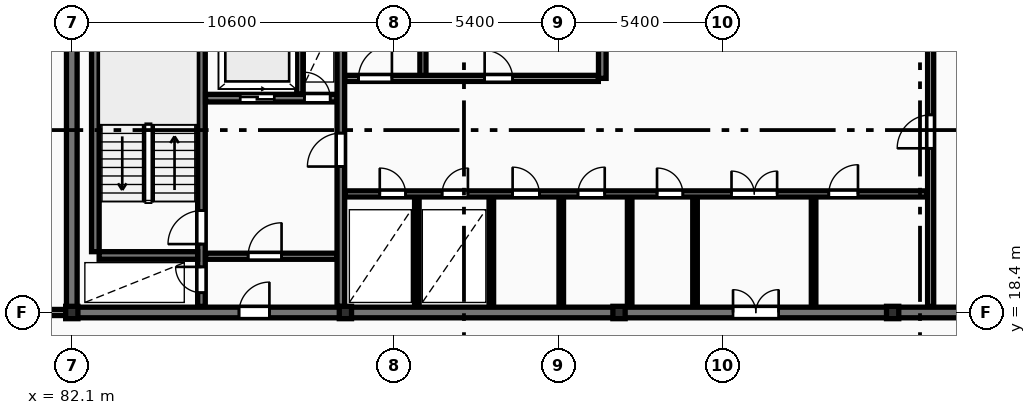
"""IFC4 building model, lengths in metres.
Left out: names, types, materials, properties, quantities, classifications, styles, units other than length and angle.
Written with IfcOpenShell. Run it as: python <this file> out.ifc"""

import sys

from ifc_helpers import new_model, si_unit, direction, frame, frame_2d, origin, origin_2d, place, context, subcontext, project, spatial, rectangle, i_section, extrude, element, fill, save


model = new_model("IFC4")
c1 = context("Model", 3, precision=1e-05, world=origin(), true_north=direction((0.0, 1.0)))
c2 = subcontext(c1, "Body", "Model", "MODEL_VIEW")
j1 = project(units=[si_unit("LENGTHUNIT", "METRE"), si_unit("PLANEANGLEUNIT", "RADIAN")], contexts=[c1])
p1 = place(None, origin())
s1 = spatial("IfcSite", under=j1, at=p1, CompositionType="ELEMENT")
p2 = place(p1, origin())
s2 = spatial("IfcBuilding", under=s1, at=p2, CompositionType="ELEMENT")
p3 = place(p2, frame((0.0, 0.0, 146.5)))
s3 = spatial("IfcBuildingStorey", under=s2, at=p3, CompositionType="ELEMENT", Elevation=146.5)
for number, where, z_axis, x_axis in (
    (1, (82.1, 18.4, 0.0), (0.0, 0.0, 1.0), (1.0, 0.0, 0.0)),
    (2, (91.1, 18.4, 0.0), (0.0, 0.0, 1.0), (1.0, 0.0, 0.0)),
    (3, (100.1, 18.4, 0.0), (0.0, 0.0, 1.0), (1.0, 0.0, 0.0)),
    (4, (109.1, 18.4, 0.0), (0.0, 0.0, 1.0), (1.0, 0.0, 0.0)),
):
    element("IfcColumn", number, at=place(p3, frame(where, z_axis=z_axis, x_axis=x_axis)), inside=s3, PredefinedType="COLUMN", context=c2, shape_type="SweptSolid", body=[
        extrude(i_section(OverallWidth=0.403, OverallDepth=0.406, WebThickness=0.027, FlangeThickness=0.043, FilletRadius=0.015, at=origin_2d()), origin(), (0.0, 0.0, 1.0), 3.6),
    ])
p4 = place(p3, frame((82.1, 18.575, 0.0), z_axis=(0.0, 0.0, 1.0), x_axis=(0.0, 1.0, 0.0)))
e5 = element("IfcWall", 5, at=p4, inside=s3, PredefinedType="SHEAR", context=c2, shape_type="SweptSolid", body=[
    extrude(rectangle(XDim=11.65, YDim=0.35, at=frame_2d((5.825, 0.0))), origin(), (0.0, 0.0, 1.0), 3.6),
])
p5 = place(p3, frame((81.925, 18.4, 0.0), z_axis=(0.0, 0.0, 1.0), x_axis=(1.0, 0.0, 0.0)))
e6 = element("IfcWall", 6, at=p5, inside=s3, PredefinedType="SHEAR", context=c2, shape_type="SweptSolid", body=[
    extrude(rectangle(XDim=36.265, YDim=0.35, at=frame_2d((18.132, 0.0))), origin(), (0.0, 0.0, 1.0), 3.6),
])
p6 = place(p5, frame((5.675, 0.0, 0.0)))
e7 = element("IfcOpeningElement", 7, at=p6, cuts=e6, PredefinedType="OPENING", context=c2, shape_type="SweptSolid", body=[
    extrude(rectangle(XDim=1.0, YDim=2.15, at=frame_2d((0.5, 1.075))), frame((0.0, 0.185, 0.0), z_axis=(0.0, -1.0, 0.0), x_axis=(1.0, 0.0, 0.0)), (0.0, 0.0, 1.0), 0.37),
])
p7 = place(p5, frame((21.925, 0.0, 0.0)))
e8 = element("IfcOpeningElement", 8, at=p7, cuts=e6, PredefinedType="OPENING", context=c2, shape_type="SweptSolid", body=[
    extrude(rectangle(XDim=1.5, YDim=2.2, at=frame_2d((0.75, 1.1))), frame((0.0, 0.185, 0.0), z_axis=(0.0, -1.0, 0.0), x_axis=(1.0, 0.0, 0.0)), (0.0, 0.0, 1.0), 0.37),
])
p8 = place(p5, frame((29.875, 0.0, 0.0)))
e9 = element("IfcOpeningElement", 9, at=p8, cuts=e6, PredefinedType="OPENING", context=c2, shape_type="SweptSolid", body=[
    extrude(rectangle(XDim=1.0, YDim=2.15, at=frame_2d((0.5, 1.075))), frame((0.0, 0.185, 0.0), z_axis=(0.0, -1.0, 0.0), x_axis=(1.0, 0.0, 0.0)), (0.0, 0.0, 1.0), 0.37),
])
p9 = place(p3, frame((82.875, 20.4, 0.0), z_axis=(0.0, 0.0, 1.0), x_axis=(0.0, 1.0, 0.0)))
e10 = element("IfcWall", 10, at=p9, inside=s3, PredefinedType="SHEAR", context=c2, shape_type="SweptSolid", body=[
    extrude(rectangle(XDim=7.6, YDim=0.25, at=frame_2d((3.8, 0.0))), origin(), (0.0, 0.0, 1.0), 3.6),
])
p10 = place(p3, frame((86.365, 18.6, 0.0), z_axis=(0.0, 0.0, 1.0), x_axis=(0.0, 1.0, 0.0)))
e11 = element("IfcWall", 11, at=p10, inside=s3, PredefinedType="SHEAR", context=c2, shape_type="SweptSolid", body=[
    extrude(rectangle(XDim=11.6, YDim=0.25, at=frame_2d((5.8, 0.0))), origin(), (0.0, 0.0, 1.0), 3.6),
])
p11 = place(p10, frame((0.45, 0.0, 0.0)))
e12 = element("IfcOpeningElement", 12, at=p11, cuts=e11, PredefinedType="OPENING", context=c2, shape_type="SweptSolid", body=[
    extrude(rectangle(XDim=0.85, YDim=2.05, at=frame_2d((0.425, 1.025))), frame((0.0, 0.135, 0.0), z_axis=(0.0, -1.0, 0.0), x_axis=(1.0, 0.0, 0.0)), (0.0, 0.0, 1.0), 0.27),
])
p12 = place(p10, frame((2.05, 0.0, 0.0)))
e13 = element("IfcOpeningElement", 13, at=p12, cuts=e11, PredefinedType="OPENING", context=c2, shape_type="SweptSolid", body=[
    extrude(rectangle(XDim=1.1, YDim=2.1, at=frame_2d((0.55, 1.05))), frame((0.0, 0.135, 0.0), z_axis=(0.0, -1.0, 0.0), x_axis=(1.0, 0.0, 0.0)), (0.0, 0.0, 1.0), 0.27),
])
p13 = place(p10, frame((9.95, 0.0, 0.0)))
e14 = element("IfcOpeningElement", 14, at=p13, cuts=e11, PredefinedType="OPENING", context=c2, shape_type="SweptSolid", body=[
    extrude(rectangle(XDim=0.85, YDim=2.05, at=frame_2d((0.425, 1.025))), frame((0.0, 0.135, 0.0), z_axis=(0.0, -1.0, 0.0), x_axis=(1.0, 0.0, 0.0)), (0.0, 0.0, 1.0), 0.27),
])
p14 = place(p3, frame((83.0, 20.275, 0.0), z_axis=(0.0, 0.0, 1.0), x_axis=(1.0, 0.0, 0.0)))
e15 = element("IfcWall", 15, at=p14, inside=s3, PredefinedType="SHEAR", context=c2, shape_type="SweptSolid", body=[
    extrude(rectangle(XDim=3.24, YDim=0.25, at=frame_2d((1.62, 0.0))), origin(), (0.0, 0.0, 1.0), 3.6),
])
p15 = place(p3, frame((86.5, 25.45, 0.0), z_axis=(0.0, 0.0, 1.0), x_axis=(1.0, 0.0, 0.0)))
e16 = element("IfcWall", 16, at=p15, inside=s3, PredefinedType="SHEAR", context=c2, shape_type="SweptSolid", body=[
    extrude(rectangle(XDim=4.32, YDim=0.25, at=frame_2d((2.16, 0.0))), origin(), (0.0, 0.0, 1.0), 3.6),
])
p16 = place(p15, frame((1.14, 0.0, 0.0)))
e17 = element("IfcOpeningElement", 17, at=p16, cuts=e16, PredefinedType="OPENING", context=c2, shape_type="SweptSolid", body=[
    extrude(rectangle(XDim=1.12, YDim=2.12, at=frame_2d((0.56, 1.06))), frame((0.0, 0.135, 0.0), z_axis=(0.0, -1.0, 0.0), x_axis=(1.0, 0.0, 0.0)), (0.0, 0.0, 1.0), 0.27),
])
p17 = place(p15, frame((3.25, 0.0, 0.0)))
e18 = element("IfcOpeningElement", 18, at=p17, cuts=e16, PredefinedType="OPENING", context=c2, shape_type="SweptSolid", body=[
    extrude(rectangle(XDim=0.85, YDim=2.05, at=frame_2d((0.425, 1.025))), frame((0.0, 0.135, 0.0), z_axis=(0.0, -1.0, 0.0), x_axis=(1.0, 0.0, 0.0)), (0.0, 0.0, 1.0), 0.27),
])
p18 = place(p3, frame((89.6, 25.58, 0.0), z_axis=(0.0, 0.0, 1.0), x_axis=(0.0, 1.0, 0.0)))
e19 = element("IfcWall", 19, at=p18, inside=s3, PredefinedType="PARTITIONING", context=c2, shape_type="SweptSolid", body=[
    extrude(rectangle(XDim=2.42, YDim=0.2, at=frame_2d((1.21, 0.0))), origin(), (0.0, 0.0, 1.0), 3.31),
])
p19 = place(p3, frame((86.5, 20.25, 0.0), z_axis=(0.0, 0.0, 1.0), x_axis=(1.0, 0.0, 0.0)))
e20 = element("IfcWall", 20, at=p19, inside=s3, PredefinedType="PARTITIONING", context=c2, shape_type="SweptSolid", body=[
    extrude(rectangle(XDim=4.32, YDim=0.2, at=frame_2d((2.16, 0.0))), origin(), (0.0, 0.0, 1.0), 3.31),
])
p20 = place(p19, frame((1.4, 0.0, 0.0)))
e21 = element("IfcOpeningElement", 21, at=p20, cuts=e20, PredefinedType="OPENING", context=c2, shape_type="SweptSolid", body=[
    extrude(rectangle(XDim=1.1, YDim=2.1, at=frame_2d((0.55, 1.05))), frame((0.0, 0.11, 0.0), z_axis=(0.0, -1.0, 0.0), x_axis=(1.0, 0.0, 0.0)), (0.0, 0.0, 1.0), 0.22),
])
p21 = place(p3, frame((90.95, 18.6, 0.0), z_axis=(0.0, 0.0, 1.0), x_axis=(0.0, 1.0, 0.0)))
e22 = element("IfcWall", 22, at=p21, inside=s3, PredefinedType="SHEAR", context=c2, shape_type="SweptSolid", body=[
    extrude(rectangle(XDim=11.6, YDim=0.25, at=frame_2d((5.8, 0.0))), origin(), (0.0, 0.0, 1.0), 3.6),
])
p22 = place(p21, frame((4.6, 0.0, 0.0)))
e23 = element("IfcOpeningElement", 23, at=p22, cuts=e22, PredefinedType="OPENING", context=c2, shape_type="SweptSolid", body=[
    extrude(rectangle(XDim=1.1, YDim=2.1, at=frame_2d((0.55, 1.05))), frame((0.0, 0.135, 0.0), z_axis=(0.0, -1.0, 0.0), x_axis=(1.0, 0.0, 0.0)), (0.0, 0.0, 1.0), 0.27),
])
p23 = place(p3, frame((93.65, 26.1, 0.0), z_axis=(0.0, 0.0, 1.0), x_axis=(0.0, 1.0, 0.0)))
e24 = element("IfcWall", 24, at=p23, inside=s3, PredefinedType="PARTITIONING", context=c2, shape_type="SweptSolid", body=[
    extrude(rectangle(XDim=4.1, YDim=0.2, at=frame_2d((2.05, 0.0))), origin(), (0.0, 0.0, 1.0), 3.31),
])
p24 = place(p3, frame((91.08, 26.1, 0.0), z_axis=(0.0, 0.0, 1.0), x_axis=(1.0, 0.0, 0.0)))
e25 = element("IfcWall", 25, at=p24, inside=s3, PredefinedType="PARTITIONING", context=c2, shape_type="SweptSolid", body=[
    extrude(rectangle(XDim=8.34, YDim=0.2, at=frame_2d((4.17, 0.0))), origin(), (0.0, 0.0, 1.0), 3.31),
])
p25 = place(p24, frame((0.45, 0.0, 0.0)))
e26 = element("IfcOpeningElement", 26, at=p25, cuts=e25, PredefinedType="OPENING", context=c2, shape_type="SweptSolid", body=[
    extrude(rectangle(XDim=1.1, YDim=2.1, at=frame_2d((0.55, 1.05))), frame((0.0, 0.11, 0.0), z_axis=(0.0, -1.0, 0.0), x_axis=(1.0, 0.0, 0.0)), (0.0, 0.0, 1.0), 0.22),
])
p26 = place(p24, frame((4.6, 0.0, 0.0)))
e27 = element("IfcOpeningElement", 27, at=p26, cuts=e25, PredefinedType="OPENING", context=c2, shape_type="SweptSolid", body=[
    extrude(rectangle(XDim=0.92, YDim=2.08, at=frame_2d((0.46, 1.04))), frame((0.0, 0.11, 0.0), z_axis=(0.0, -1.0, 0.0), x_axis=(1.0, 0.0, 0.0)), (0.0, 0.0, 1.0), 0.22),
])
p27 = place(p3, frame((99.55, 26.1, 0.0), z_axis=(0.0, 0.0, 1.0), x_axis=(0.0, 1.0, 0.0)))
e28 = element("IfcWall", 28, at=p27, inside=s3, PredefinedType="SHEAR", context=c2, shape_type="SweptSolid", body=[
    extrude(rectangle(XDim=4.1, YDim=0.25, at=frame_2d((2.05, 0.0))), origin(), (0.0, 0.0, 1.0), 3.6),
])
for number, where, z_axis, x_axis in (
    (29, (93.45, 18.6, 0.0), (0.0, 0.0, 1.0), (0.0, 1.0, 0.0)),
    (30, (95.9, 18.6, 0.0), (0.0, 0.0, 1.0), (0.0, 1.0, 0.0)),
    (31, (98.2, 18.6, 0.0), (0.0, 0.0, 1.0), (0.0, 1.0, 0.0)),
    (32, (100.45, 18.6, 0.0), (0.0, 0.0, 1.0), (0.0, 1.0, 0.0)),
    (33, (102.6, 18.6, 0.0), (0.0, 0.0, 1.0), (0.0, 1.0, 0.0)),
    (34, (106.5, 18.6, 0.0), (0.0, 0.0, 1.0), (0.0, 1.0, 0.0)),
):
    element("IfcWall", number, at=place(p3, frame(where, z_axis=z_axis, x_axis=x_axis)), inside=s3, PredefinedType="PARTITIONING", context=c2, shape_type="SweptSolid", body=[
        extrude(rectangle(XDim=3.6, YDim=0.15, at=frame_2d((1.8, 0.0))), origin(), (0.0, 0.0, 1.0), 3.31),
    ])
p28 = place(p3, frame((91.08, 22.3, 0.0), z_axis=(0.0, 0.0, 1.0), x_axis=(1.0, 0.0, 0.0)))
e35 = element("IfcWall", 35, at=p28, inside=s3, PredefinedType="PARTITIONING", context=c2, shape_type="SweptSolid", body=[
    extrude(rectangle(XDim=19.14, YDim=0.2, at=frame_2d((9.57, 0.0))), origin(), (0.0, 0.0, 1.0), 3.31),
])
p29 = place(p28, frame((1.15, 0.0, 0.0)))
e36 = element("IfcOpeningElement", 36, at=p29, cuts=e35, PredefinedType="OPENING", context=c2, shape_type="SweptSolid", body=[
    extrude(rectangle(XDim=0.85, YDim=2.05, at=frame_2d((0.425, 1.025))), frame((0.0, 0.11, 0.0), z_axis=(0.0, -1.0, 0.0), x_axis=(1.0, 0.0, 0.0)), (0.0, 0.0, 1.0), 0.22),
])
p30 = place(p28, frame((3.2, 0.0, 0.0)))
e37 = element("IfcOpeningElement", 37, at=p30, cuts=e35, PredefinedType="OPENING", context=c2, shape_type="SweptSolid", body=[
    extrude(rectangle(XDim=0.85, YDim=2.05, at=frame_2d((0.425, 1.025))), frame((0.0, 0.11, 0.0), z_axis=(0.0, -1.0, 0.0), x_axis=(1.0, 0.0, 0.0)), (0.0, 0.0, 1.0), 0.22),
])
p31 = place(p28, frame((12.72, 0.0, 0.0)))
e38 = element("IfcOpeningElement", 38, at=p31, cuts=e35, PredefinedType="OPENING", context=c2, shape_type="SweptSolid", body=[
    extrude(rectangle(XDim=1.5, YDim=2.2, at=frame_2d((0.75, 1.1))), frame((0.0, 0.11, 0.0), z_axis=(0.0, -1.0, 0.0), x_axis=(1.0, 0.0, 0.0)), (0.0, 0.0, 1.0), 0.22),
])
p32 = place(p28, frame((5.52, 0.0, 0.0)))
e39 = element("IfcOpeningElement", 39, at=p32, cuts=e35, PredefinedType="OPENING", context=c2, shape_type="SweptSolid", body=[
    extrude(rectangle(XDim=0.88, YDim=2.06, at=frame_2d((0.44, 1.03))), frame((0.0, 0.11, 0.0), z_axis=(0.0, -1.0, 0.0), x_axis=(1.0, 0.0, 0.0)), (0.0, 0.0, 1.0), 0.22),
])
p33 = place(p28, frame((7.67, 0.0, 0.0)))
e40 = element("IfcOpeningElement", 40, at=p33, cuts=e35, PredefinedType="OPENING", context=c2, shape_type="SweptSolid", body=[
    extrude(rectangle(XDim=0.88, YDim=2.06, at=frame_2d((0.44, 1.03))), frame((0.0, 0.11, 0.0), z_axis=(0.0, -1.0, 0.0), x_axis=(1.0, 0.0, 0.0)), (0.0, 0.0, 1.0), 0.22),
])
p34 = place(p28, frame((10.27, 0.0, 0.0)))
e41 = element("IfcOpeningElement", 41, at=p34, cuts=e35, PredefinedType="OPENING", context=c2, shape_type="SweptSolid", body=[
    extrude(rectangle(XDim=0.85, YDim=2.05, at=frame_2d((0.425, 1.025))), frame((0.0, 0.11, 0.0), z_axis=(0.0, -1.0, 0.0), x_axis=(1.0, 0.0, 0.0)), (0.0, 0.0, 1.0), 0.22),
])
p35 = place(p28, frame((15.92, 0.0, 0.0)))
e42 = element("IfcOpeningElement", 42, at=p35, cuts=e35, PredefinedType="OPENING", context=c2, shape_type="SweptSolid", body=[
    extrude(rectangle(XDim=0.96, YDim=2.1, at=frame_2d((0.48, 1.05))), frame((0.0, 0.11, 0.0), z_axis=(0.0, -1.0, 0.0), x_axis=(1.0, 0.0, 0.0)), (0.0, 0.0, 1.0), 0.22),
])
p36 = place(p3, frame((110.35, 18.6, 0.0), z_axis=(0.0, 0.0, 1.0), x_axis=(0.0, 1.0, 0.0)))
e43 = element("IfcWall", 43, at=p36, inside=s3, PredefinedType="PARTITIONING", context=c2, shape_type="SweptSolid", body=[
    extrude(rectangle(XDim=11.6, YDim=0.2, at=frame_2d((5.8, 0.0))), origin(), (0.0, 0.0, 1.0), 3.31),
])
p37 = place(p36, frame((5.2, 0.0, 0.0)))
e44 = element("IfcOpeningElement", 44, at=p37, cuts=e43, PredefinedType="OPENING", context=c2, shape_type="SweptSolid", body=[
    extrude(rectangle(XDim=1.1, YDim=2.15, at=frame_2d((0.55, 1.075))), frame((0.0, 0.11, 0.0), z_axis=(0.0, -1.0, 0.0), x_axis=(1.0, 0.0, 0.0)), (0.0, 0.0, 1.0), 0.22),
])
p38 = place(p3, frame((72.7, 18.4, 0.0), z_axis=(0.0, 0.0, 1.0), x_axis=(1.0, 0.0, 0.0)))
e45 = element("IfcWall", 45, at=p38, inside=s3, PredefinedType="PARTITIONING", context=c2, shape_type="SweptSolid", body=[
    extrude(rectangle(XDim=9.25, YDim=0.2, at=frame_2d((4.625, 0.0))), origin(), (0.0, 0.0, 1.0), 2.698),
])
p39 = place(p38, frame((4.15, 0.0, 0.0)))
e46 = element("IfcOpeningElement", 46, at=p39, cuts=e45, PredefinedType="OPENING", context=c2, shape_type="SweptSolid", body=[
    extrude(rectangle(XDim=0.95, YDim=2.15, at=frame_2d((0.475, 1.075))), frame((0.0, 0.11, 0.0), z_axis=(0.0, -1.0, 0.0), x_axis=(1.0, 0.0, 0.0)), (0.0, 0.0, 1.0), 0.22),
])
p40 = place(p6, origin())
e47 = element("IfcDoor", 47, at=p40, inside=s3, OperationType="SINGLE_SWING_RIGHT", PredefinedType="DOOR", context=c2, shape_type="SweptSolid", body=[
    extrude(rectangle(XDim=1.0, YDim=2.15, at=frame_2d((0.5, 1.075))), frame((0.0, 0.025, 0.0), z_axis=(0.0, -1.0, 0.0), x_axis=(1.0, 0.0, 0.0)), (0.0, 0.0, 1.0), 0.05),
])
fill(e7, e47)
p41 = place(p7, origin())
e48 = element("IfcDoor", 48, at=p41, inside=s3, OperationType="DOUBLE_DOOR_SINGLE_SWING", PredefinedType="DOOR", context=c2, shape_type="SweptSolid", body=[
    extrude(rectangle(XDim=1.5, YDim=2.2, at=frame_2d((0.75, 1.1))), frame((0.0, 0.025, 0.0), z_axis=(0.0, -1.0, 0.0), x_axis=(1.0, 0.0, 0.0)), (0.0, 0.0, 1.0), 0.05),
])
fill(e8, e48)
p42 = place(p11, origin())
e49 = element("IfcDoor", 49, at=p42, inside=s3, OperationType="SINGLE_SWING_RIGHT", PredefinedType="DOOR", context=c2, shape_type="SweptSolid", body=[
    extrude(rectangle(XDim=0.85, YDim=2.05, at=frame_2d((0.425, 1.025))), frame((0.0, 0.025, 0.0), z_axis=(0.0, -1.0, 0.0), x_axis=(1.0, 0.0, 0.0)), (0.0, 0.0, 1.0), 0.05),
])
fill(e12, e49)
p43 = place(p12, origin())
e50 = element("IfcDoor", 50, at=p43, inside=s3, OperationType="SINGLE_SWING_LEFT", PredefinedType="DOOR", context=c2, shape_type="SweptSolid", body=[
    extrude(rectangle(XDim=1.1, YDim=2.1, at=frame_2d((0.55, 1.05))), frame((0.0, 0.025, 0.0), z_axis=(0.0, -1.0, 0.0), x_axis=(1.0, 0.0, 0.0)), (0.0, 0.0, 1.0), 0.05),
])
fill(e13, e50)
p44 = place(p16, origin())
e51 = element("IfcDoor", 51, at=p44, inside=s3, OperationType="SLIDING_TO_RIGHT", PredefinedType="DOOR", context=c2, shape_type="SweptSolid", body=[
    extrude(rectangle(XDim=1.12, YDim=2.12, at=frame_2d((0.56, 1.06))), frame((0.0, 0.025, 0.0), z_axis=(0.0, -1.0, 0.0), x_axis=(1.0, 0.0, 0.0)), (0.0, 0.0, 1.0), 0.05),
])
fill(e17, e51)
p45 = place(p17, origin())
e52 = element("IfcDoor", 52, at=p45, inside=s3, OperationType="SINGLE_SWING_LEFT", PredefinedType="DOOR", context=c2, shape_type="SweptSolid", body=[
    extrude(rectangle(XDim=0.85, YDim=2.05, at=frame_2d((0.425, 1.025))), frame((0.0, 0.025, 0.0), z_axis=(0.0, -1.0, 0.0), x_axis=(1.0, 0.0, 0.0)), (0.0, 0.0, 1.0), 0.05),
])
fill(e18, e52)
p46 = place(p20, origin())
e53 = element("IfcDoor", 53, at=p46, inside=s3, OperationType="SINGLE_SWING_RIGHT", PredefinedType="DOOR", context=c2, shape_type="SweptSolid", body=[
    extrude(rectangle(XDim=1.1, YDim=2.1, at=frame_2d((0.55, 1.05))), frame((0.0, 0.025, 0.0), z_axis=(0.0, -1.0, 0.0), x_axis=(1.0, 0.0, 0.0)), (0.0, 0.0, 1.0), 0.05),
])
fill(e21, e53)
p47 = place(p22, origin())
e54 = element("IfcDoor", 54, at=p47, inside=s3, OperationType="SINGLE_SWING_LEFT", PredefinedType="DOOR", context=c2, shape_type="SweptSolid", body=[
    extrude(rectangle(XDim=1.1, YDim=2.1, at=frame_2d((0.55, 1.05))), frame((0.0, 0.025, 0.0), z_axis=(0.0, -1.0, 0.0), x_axis=(1.0, 0.0, 0.0)), (0.0, 0.0, 1.0), 0.05),
])
fill(e23, e54)
p48 = place(p25, origin())
e55 = element("IfcDoor", 55, at=p48, inside=s3, OperationType="SINGLE_SWING_RIGHT", PredefinedType="DOOR", context=c2, shape_type="SweptSolid", body=[
    extrude(rectangle(XDim=1.1, YDim=2.1, at=frame_2d((0.55, 1.05))), frame((0.0, 0.025, 0.0), z_axis=(0.0, -1.0, 0.0), x_axis=(1.0, 0.0, 0.0)), (0.0, 0.0, 1.0), 0.05),
])
fill(e26, e55)
p49 = place(p26, origin())
e56 = element("IfcDoor", 56, at=p49, inside=s3, OperationType="SINGLE_SWING_LEFT", PredefinedType="DOOR", context=c2, shape_type="SweptSolid", body=[
    extrude(rectangle(XDim=0.92, YDim=2.08, at=frame_2d((0.46, 1.04))), frame((0.0, 0.025, 0.0), z_axis=(0.0, -1.0, 0.0), x_axis=(1.0, 0.0, 0.0)), (0.0, 0.0, 1.0), 0.05),
])
fill(e27, e56)
p50 = place(p29, origin())
e57 = element("IfcDoor", 57, at=p50, inside=s3, OperationType="SINGLE_SWING_LEFT", PredefinedType="DOOR", context=c2, shape_type="SweptSolid", body=[
    extrude(rectangle(XDim=0.85, YDim=2.05, at=frame_2d((0.425, 1.025))), frame((0.0, 0.025, 0.0), z_axis=(0.0, -1.0, 0.0), x_axis=(1.0, 0.0, 0.0)), (0.0, 0.0, 1.0), 0.05),
])
fill(e36, e57)
p51 = place(p30, origin())
e58 = element("IfcDoor", 58, at=p51, inside=s3, OperationType="SINGLE_SWING_RIGHT", PredefinedType="DOOR", context=c2, shape_type="SweptSolid", body=[
    extrude(rectangle(XDim=0.85, YDim=2.05, at=frame_2d((0.425, 1.025))), frame((0.0, 0.025, 0.0), z_axis=(0.0, -1.0, 0.0), x_axis=(1.0, 0.0, 0.0)), (0.0, 0.0, 1.0), 0.05),
])
fill(e37, e58)
p52 = place(p31, origin())
e59 = element("IfcDoor", 59, at=p52, inside=s3, OperationType="DOUBLE_DOOR_SINGLE_SWING", PredefinedType="DOOR", context=c2, shape_type="SweptSolid", body=[
    extrude(rectangle(XDim=1.5, YDim=2.2, at=frame_2d((0.75, 1.1))), frame((0.0, 0.025, 0.0), z_axis=(0.0, -1.0, 0.0), x_axis=(1.0, 0.0, 0.0)), (0.0, 0.0, 1.0), 0.05),
])
fill(e38, e59)
p53 = place(p32, origin())
e60 = element("IfcDoor", 60, at=p53, inside=s3, OperationType="SINGLE_SWING_LEFT", PredefinedType="DOOR", context=c2, shape_type="SweptSolid", body=[
    extrude(rectangle(XDim=0.88, YDim=2.06, at=frame_2d((0.44, 1.03))), frame((0.0, 0.025, 0.0), z_axis=(0.0, -1.0, 0.0), x_axis=(1.0, 0.0, 0.0)), (0.0, 0.0, 1.0), 0.05),
])
fill(e39, e60)
p54 = place(p33, origin())
e61 = element("IfcDoor", 61, at=p54, inside=s3, OperationType="SINGLE_SWING_RIGHT", PredefinedType="DOOR", context=c2, shape_type="SweptSolid", body=[
    extrude(rectangle(XDim=0.88, YDim=2.06, at=frame_2d((0.44, 1.03))), frame((0.0, 0.025, 0.0), z_axis=(0.0, -1.0, 0.0), x_axis=(1.0, 0.0, 0.0)), (0.0, 0.0, 1.0), 0.05),
])
fill(e40, e61)
p55 = place(p34, origin())
e62 = element("IfcDoor", 62, at=p55, inside=s3, OperationType="SINGLE_SWING_LEFT", PredefinedType="DOOR", context=c2, shape_type="SweptSolid", body=[
    extrude(rectangle(XDim=0.85, YDim=2.05, at=frame_2d((0.425, 1.025))), frame((0.0, 0.025, 0.0), z_axis=(0.0, -1.0, 0.0), x_axis=(1.0, 0.0, 0.0)), (0.0, 0.0, 1.0), 0.05),
])
fill(e41, e62)
p56 = place(p35, origin())
e63 = element("IfcDoor", 63, at=p56, inside=s3, OperationType="SINGLE_SWING_RIGHT", PredefinedType="DOOR", context=c2, shape_type="SweptSolid", body=[
    extrude(rectangle(XDim=0.96, YDim=2.1, at=frame_2d((0.48, 1.05))), frame((0.0, 0.025, 0.0), z_axis=(0.0, -1.0, 0.0), x_axis=(1.0, 0.0, 0.0)), (0.0, 0.0, 1.0), 0.05),
])
fill(e42, e63)
p57 = place(p37, origin())
e64 = element("IfcDoor", 64, at=p57, inside=s3, OperationType="SINGLE_SWING_LEFT", PredefinedType="DOOR", context=c2, shape_type="SweptSolid", body=[
    extrude(rectangle(XDim=1.1, YDim=2.15, at=frame_2d((0.55, 1.075))), frame((0.0, 0.025, 0.0), z_axis=(0.0, -1.0, 0.0), x_axis=(1.0, 0.0, 0.0)), (0.0, 0.0, 1.0), 0.05),
])
fill(e44, e64)
save(model, sys.argv[1])
